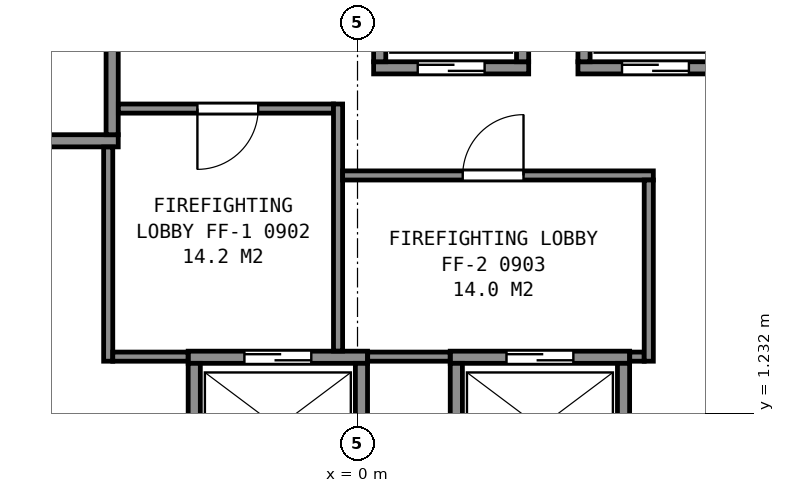
"""IFC4 building model, lengths in metres.
Left out: names, types, materials, properties, quantities, classifications, styles, units other than length and angle.
Written with IfcOpenShell. Run it as: python <this file> out.ifc"""

import sys

from ifc_helpers import new_model, si_unit, direction, frame, frame_2d, origin, place, context, subcontext, project, spatial, rectangle, extrude, element, fill, save


model = new_model("IFC4")
c1 = context("Model", 3, precision=1e-05, world=origin(), true_north=direction((0.0, 1.0)))
c2 = subcontext(c1, "Body", "Model", "MODEL_VIEW")
j1 = project(units=[si_unit("LENGTHUNIT", "METRE"), si_unit("PLANEANGLEUNIT", "RADIAN")], contexts=[c1])
p1 = place(None, origin())
s1 = spatial("IfcSite", under=j1, at=p1, CompositionType="ELEMENT")
p2 = place(p1, origin())
s2 = spatial("IfcBuilding", under=s1, at=p2, CompositionType="ELEMENT")
p3 = place(p2, frame((0.0, 0.0, 47.6)))
s3 = spatial("IfcBuildingStorey", under=s2, at=p3, CompositionType="ELEMENT", Elevation=47.6)
p4 = place(p3, frame((-2.785, 2.15, 0.0), z_axis=(0.0, 0.0, 1.0), x_axis=(1.0, 0.0, 0.0)))
e1 = element("IfcWall", 1, at=p4, inside=s3, PredefinedType="PARTITIONING", context=c2, shape_type="SweptSolid", body=[
    extrude(rectangle(XDim=2.95, YDim=0.2, at=frame_2d((1.475, 0.0))), origin(), (0.0, 0.0, 1.0), 3.6),
])
p5 = place(p4, frame((0.925, 0.0, 0.0)))
e2 = element("IfcOpeningElement", 2, at=p5, cuts=e1, PredefinedType="OPENING", context=c2, shape_type="SweptSolid", body=[
    extrude(rectangle(XDim=1.1, YDim=2.1, at=frame_2d((0.55, 1.05))), frame((0.0, 0.11, 0.0), z_axis=(0.0, -1.0, 0.0), x_axis=(1.0, 0.0, 0.0)), (0.0, 0.0, 1.0), 0.22),
])
p6 = place(p3, frame((1.525, 2.15, 0.0), z_axis=(0.0, 0.0, 1.0), x_axis=(1.0, 0.0, 0.0)))
e3 = element("IfcWall", 3, at=p6, inside=s3, PredefinedType="PARTITIONING", context=c2, shape_type="SweptSolid", body=[
    extrude(rectangle(XDim=2.95, YDim=0.2, at=frame_2d((1.475, 0.0))), origin(), (0.0, 0.0, 1.0), 3.6),
])
p7 = place(p6, frame((0.925, 0.0, 0.0)))
e4 = element("IfcOpeningElement", 4, at=p7, cuts=e3, PredefinedType="OPENING", context=c2, shape_type="SweptSolid", body=[
    extrude(rectangle(XDim=1.1, YDim=2.1, at=frame_2d((0.55, 1.05))), frame((0.0, 0.11, 0.0), z_axis=(0.0, -1.0, 0.0), x_axis=(1.0, 0.0, 0.0)), (0.0, 0.0, 1.0), 0.22),
])
p8 = place(p3, frame((-6.285, 5.71, 0.0), z_axis=(0.0, 0.0, 1.0), x_axis=(1.0, 0.0, 0.0)))
e5 = element("IfcWall", 5, at=p8, inside=s3, PredefinedType="PARTITIONING", context=c2, shape_type="SweptSolid", body=[
    extrude(rectangle(XDim=2.35, YDim=0.2, at=frame_2d((1.175, 0.0))), origin(), (0.0, 0.0, 1.0), 3.6),
])
p9 = place(p3, frame((0.265, 6.91, 0.0), z_axis=(0.0, 0.0, 1.0), x_axis=(1.0, 0.0, 0.0)))
e6 = element("IfcWall", 6, at=p9, inside=s3, PredefinedType="PARTITIONING", context=c2, shape_type="SweptSolid", body=[
    extrude(rectangle(XDim=2.55, YDim=0.2, at=frame_2d((1.275, 0.0))), origin(), (0.0, 0.0, 1.0), 3.6),
])
p10 = place(p9, frame((0.725, 0.0, 0.0)))
e7 = element("IfcOpeningElement", 7, at=p10, cuts=e6, PredefinedType="OPENING", context=c2, shape_type="SweptSolid", body=[
    extrude(rectangle(XDim=1.1, YDim=2.1, at=frame_2d((0.55, 1.05))), frame((0.0, 0.11, 0.0), z_axis=(0.0, -1.0, 0.0), x_axis=(1.0, 0.0, 0.0)), (0.0, 0.0, 1.0), 0.22),
])
p11 = place(p3, frame((3.625, 6.91, 0.0), z_axis=(0.0, 0.0, 1.0), x_axis=(1.0, 0.0, 0.0)))
e8 = element("IfcWall", 8, at=p11, inside=s3, PredefinedType="PARTITIONING", context=c2, shape_type="SweptSolid", body=[
    extrude(rectangle(XDim=2.55, YDim=0.2, at=frame_2d((1.275, 0.0))), origin(), (0.0, 0.0, 1.0), 3.6),
])
p12 = place(p11, frame((0.725, 0.0, 0.0)))
e9 = element("IfcOpeningElement", 9, at=p12, cuts=e8, PredefinedType="OPENING", context=c2, shape_type="SweptSolid", body=[
    extrude(rectangle(XDim=1.1, YDim=2.1, at=frame_2d((0.55, 1.05))), frame((0.0, 0.11, 0.0), z_axis=(0.0, -1.0, 0.0), x_axis=(1.0, 0.0, 0.0)), (0.0, 0.0, 1.0), 0.22),
])
p13 = place(p3, frame((5.663, -1.612, 0.0), z_axis=(0.0, 0.0, 1.0), x_axis=(0.49998122708, 0.866036242063, 0.0)))
e10 = element("IfcWall", 10, at=p13, inside=s3, PredefinedType="PARTITIONING", context=c2, shape_type="SweptSolid", body=[
    extrude(rectangle(XDim=4.9, YDim=0.2, at=frame_2d((2.45, 0.0))), origin(), (0.0, 0.0, 1.0), 3.6),
])
p14 = place(p3, frame((4.375, 0.1, 0.0), z_axis=(0.0, 0.0, 1.0), x_axis=(0.0, 1.0, 0.0)))
e11 = element("IfcWall", 11, at=p14, inside=s3, PredefinedType="PARTITIONING", context=c2, shape_type="SweptSolid", body=[
    extrude(rectangle(XDim=1.95, YDim=0.2, at=frame_2d((0.975, 0.0))), origin(), (0.0, 0.0, 1.0), 3.6),
])
for number, where, z_axis, x_axis in (
    (12, (3.725, 7.01, 0.0), (0.0, 0.0, 1.0), (0.0, 1.0, 0.0)),
    (13, (2.715, 7.01, 0.0), (0.0, 0.0, 1.0), (0.0, 1.0, 0.0)),
):
    element("IfcWall", number, at=place(p3, frame(where, z_axis=z_axis, x_axis=x_axis)), inside=s3, PredefinedType="PARTITIONING", context=c2, shape_type="SweptSolid", body=[
        extrude(rectangle(XDim=1.75, YDim=0.2, at=frame_2d((0.875, 0.0))), origin(), (0.0, 0.0, 1.0), 3.6),
    ])
p15 = place(p3, frame((1.625, 0.1, 0.0), z_axis=(0.0, 0.0, 1.0), x_axis=(0.0, 1.0, 0.0)))
e14 = element("IfcWall", 14, at=p15, inside=s3, PredefinedType="PARTITIONING", context=c2, shape_type="SweptSolid", body=[
    extrude(rectangle(XDim=1.95, YDim=0.2, at=frame_2d((0.975, 0.0))), origin(), (0.0, 0.0, 1.0), 3.6),
])
p16 = place(p3, frame((0.365, 7.01, 0.0), z_axis=(0.0, 0.0, 1.0), x_axis=(0.0, 1.0, 0.0)))
e15 = element("IfcWall", 15, at=p16, inside=s3, PredefinedType="PARTITIONING", context=c2, shape_type="SweptSolid", body=[
    extrude(rectangle(XDim=1.75, YDim=0.2, at=frame_2d((0.875, 0.0))), origin(), (0.0, 0.0, 1.0), 3.6),
])
for number, where, z_axis, x_axis in (
    (16, (0.065, 0.1, 0.0), (0.0, 0.0, 1.0), (0.0, 1.0, 0.0)),
    (17, (-2.685, 0.1, 0.0), (0.0, 0.0, 1.0), (0.0, 1.0, 0.0)),
):
    element("IfcWall", number, at=place(p3, frame(where, z_axis=z_axis, x_axis=x_axis)), inside=s3, PredefinedType="PARTITIONING", context=c2, shape_type="SweptSolid", body=[
        extrude(rectangle(XDim=1.95, YDim=0.2, at=frame_2d((0.975, 0.0))), origin(), (0.0, 0.0, 1.0), 3.6),
    ])
p17 = place(p3, frame((-4.035, 5.81, 0.0), z_axis=(0.0, 0.0, 1.0), x_axis=(0.0, 1.0, 0.0)))
e18 = element("IfcWall", 18, at=p17, inside=s3, PredefinedType="PARTITIONING", context=c2, shape_type="SweptSolid", body=[
    extrude(rectangle(XDim=1.75, YDim=0.2, at=frame_2d((0.875, 0.0))), origin(), (0.0, 0.0, 1.0), 3.6),
])
p18 = place(p3, frame((-13.664, 5.946, 0.0), z_axis=(0.0, 0.0, 1.0), x_axis=(0.499994327219, -0.866028678941, 0.0)))
e19 = element("IfcWall", 19, at=p18, inside=s3, PredefinedType="PARTITIONING", context=c2, shape_type="SweptSolid", body=[
    extrude(rectangle(XDim=23.968, YDim=0.2, at=frame_2d((11.984, 0.0))), origin(), (0.0, 0.0, 1.0), 3.35),
])
p19 = place(p3, frame((-4.1, 2.085, 0.0), z_axis=(0.0, 0.0, 1.0), x_axis=(0.0, 1.0, 0.0)))
e20 = element("IfcWall", 20, at=p19, inside=s3, PredefinedType="PARTITIONING", context=c2, shape_type="SweptSolid", body=[
    extrude(rectangle(XDim=3.523, YDim=0.15, at=frame_2d((1.761, 0.0))), origin(), (0.0, 0.0, 1.0), 3.35),
])
p20 = place(p3, frame((-4.025, 2.16, 0.0), z_axis=(0.0, 0.0, 1.0), x_axis=(1.0, 0.0, 0.0)))
e21 = element("IfcWall", 21, at=p20, inside=s3, PredefinedType="PARTITIONING", context=c2, shape_type="SweptSolid", body=[
    extrude(rectangle(XDim=1.238, YDim=0.15, at=frame_2d((0.619, 0.0))), origin(), (0.0, 0.0, 1.0), 3.35),
])
p21 = place(p3, frame((-3.933, 6.24, 0.0), z_axis=(0.0, 0.0, 1.0), x_axis=(1.0, 0.0, 0.0)))
e22 = element("IfcWall", 22, at=p21, inside=s3, PredefinedType="PARTITIONING", context=c2, shape_type="SweptSolid", body=[
    extrude(rectangle(XDim=3.538, YDim=0.15, at=frame_2d((1.769, 0.0))), origin(), (0.0, 0.0, 1.0), 3.35),
])
p22 = place(p21, frame((1.3, 0.0, 0.0)))
e23 = element("IfcOpeningElement", 23, at=p22, cuts=e22, PredefinedType="OPENING", context=c2, shape_type="SweptSolid", body=[
    extrude(rectangle(XDim=1.0, YDim=2.1, at=frame_2d((0.5, 1.05))), frame((0.0, 0.085, 0.0), z_axis=(0.0, -1.0, 0.0), x_axis=(1.0, 0.0, 0.0)), (0.0, 0.0, 1.0), 0.17),
])
p23 = place(p3, frame((-0.32, 2.252, 0.0), z_axis=(0.0, 0.0, 1.0), x_axis=(0.0, 1.0, 0.0)))
e24 = element("IfcWall", 24, at=p23, inside=s3, PredefinedType="PARTITIONING", context=c2, shape_type="SweptSolid", body=[
    extrude(rectangle(XDim=4.063, YDim=0.15, at=frame_2d((2.031, 0.0))), origin(), (0.0, 0.0, 1.0), 3.35),
])
p24 = place(p3, frame((-0.245, 5.14, 0.0), z_axis=(0.0, 0.0, 1.0), x_axis=(1.0, 0.0, 0.0)))
e25 = element("IfcWall", 25, at=p24, inside=s3, PredefinedType="PARTITIONING", context=c2, shape_type="SweptSolid", body=[
    extrude(rectangle(XDim=5.11, YDim=0.15, at=frame_2d((2.555, 0.0))), origin(), (0.0, 0.0, 1.0), 3.35),
])
p25 = place(p24, frame((1.975, 0.0, 0.0)))
e26 = element("IfcOpeningElement", 26, at=p25, cuts=e25, PredefinedType="OPENING", context=c2, shape_type="SweptSolid", body=[
    extrude(rectangle(XDim=1.0, YDim=2.1, at=frame_2d((0.5, 1.05))), frame((0.0, 0.085, 0.0), z_axis=(0.0, -1.0, 0.0), x_axis=(1.0, 0.0, 0.0)), (0.0, 0.0, 1.0), 0.17),
])
p26 = place(p3, frame((0.167, 2.16, 0.0), z_axis=(0.0, 0.0, 1.0), x_axis=(1.0, 0.0, 0.0)))
e27 = element("IfcWall", 27, at=p26, inside=s3, PredefinedType="PARTITIONING", context=c2, shape_type="SweptSolid", body=[
    extrude(rectangle(XDim=1.356, YDim=0.15, at=frame_2d((0.678, 0.0))), origin(), (0.0, 0.0, 1.0), 3.35),
])
p27 = place(p3, frame((4.477, 2.16, 0.0), z_axis=(0.0, 0.0, 1.0), x_axis=(1.0, 0.0, 0.0)))
e28 = element("IfcWall", 28, at=p27, inside=s3, PredefinedType="PARTITIONING", context=c2, shape_type="SweptSolid", body=[
    extrude(rectangle(XDim=0.238, YDim=0.15, at=frame_2d((0.119, 0.0))), origin(), (0.0, 0.0, 1.0), 3.35),
])
p28 = place(p3, frame((4.79, 2.085, 0.0), z_axis=(0.0, 0.0, 1.0), x_axis=(0.0, 1.0, 0.0)))
e29 = element("IfcWall", 29, at=p28, inside=s3, PredefinedType="PARTITIONING", context=c2, shape_type="SweptSolid", body=[
    extrude(rectangle(XDim=2.98, YDim=0.15, at=frame_2d((1.49, 0.0))), origin(), (0.0, 0.0, 1.0), 3.35),
])
p29 = place(p3, frame((-3.766, -17.959, 0.0), z_axis=(0.0, 0.0, 1.0), x_axis=(-0.500002884005, 0.866023738697, 0.0)))
e30 = element("IfcWall", 30, at=p29, inside=s3, PredefinedType="PARTITIONING", context=c2, shape_type="SweptSolid", body=[
    extrude(rectangle(XDim=28.135, YDim=0.125, at=frame_2d((14.067, 0.0))), origin(), (0.0, 0.0, 1.0), 2.613),
])
p30 = place(p29, frame((25.422, 0.0, 0.0)))
e31 = element("IfcOpeningElement", 31, at=p30, cuts=e30, PredefinedType="OPENING", context=c2, shape_type="SweptSolid", body=[
    extrude(rectangle(XDim=1.0, YDim=2.1, at=frame_2d((0.5, 1.05))), frame((0.0, 0.073, 0.0), z_axis=(0.0, -1.0, 0.0), x_axis=(1.0, 0.0, 0.0)), (0.0, 0.0, 1.0), 0.145),
])
p31 = place(p29, frame((21.693, 0.0, 0.0)))
e32 = element("IfcOpeningElement", 32, at=p31, cuts=e30, PredefinedType="OPENING", context=c2, shape_type="SweptSolid", body=[
    extrude(rectangle(XDim=0.9, YDim=2.1, at=frame_2d((0.45, 1.05))), frame((0.0, 0.073, 0.0), z_axis=(0.0, -1.0, 0.0), x_axis=(1.0, 0.0, 0.0)), (0.0, 0.0, 1.0), 0.145),
])
p32 = place(p29, frame((14.438, 0.0, 0.0)))
e33 = element("IfcOpeningElement", 33, at=p32, cuts=e30, PredefinedType="OPENING", context=c2, shape_type="SweptSolid", body=[
    extrude(rectangle(XDim=0.9, YDim=2.1, at=frame_2d((0.45, 1.05))), frame((0.0, 0.073, 0.0), z_axis=(0.0, -1.0, 0.0), x_axis=(1.0, 0.0, 0.0)), (0.0, 0.0, 1.0), 0.145),
])
p33 = place(p29, frame((11.712, 0.0, 0.0)))
e34 = element("IfcOpeningElement", 34, at=p33, cuts=e30, PredefinedType="OPENING", context=c2, shape_type="SweptSolid", body=[
    extrude(rectangle(XDim=0.9, YDim=2.1, at=frame_2d((0.45, 1.05))), frame((0.0, 0.073, 0.0), z_axis=(0.0, -1.0, 0.0), x_axis=(1.0, 0.0, 0.0)), (0.0, 0.0, 1.0), 0.145),
])
p34 = place(p29, frame((4.787, 0.0, 0.0)))
e35 = element("IfcOpeningElement", 35, at=p34, cuts=e30, PredefinedType="OPENING", context=c2, shape_type="SweptSolid", body=[
    extrude(rectangle(XDim=0.9, YDim=2.1, at=frame_2d((0.45, 1.05))), frame((0.0, 0.073, 0.0), z_axis=(0.0, -1.0, 0.0), x_axis=(1.0, 0.0, 0.0)), (0.0, 0.0, 1.0), 0.145),
])
p35 = place(p29, frame((1.762, 0.0, 0.0)))
e36 = element("IfcOpeningElement", 36, at=p35, cuts=e30, PredefinedType="OPENING", context=c2, shape_type="SweptSolid", body=[
    extrude(rectangle(XDim=0.9, YDim=2.1, at=frame_2d((0.45, 1.05))), frame((0.0, 0.073, 0.0), z_axis=(0.0, -1.0, 0.0), x_axis=(1.0, 0.0, 0.0)), (0.0, 0.0, 1.0), 0.145),
])
p36 = place(p3, frame((17.833, 6.406, 0.0), z_axis=(0.0, 0.0, 1.0), x_axis=(-0.500002884005, -0.866023738697, 0.0)))
e37 = element("IfcWall", 37, at=p36, inside=s3, PredefinedType="PARTITIONING", context=c2, shape_type="SweptSolid", body=[
    extrude(rectangle(XDim=28.135, YDim=0.125, at=frame_2d((14.067, 0.0))), origin(), (0.0, 0.0, 1.0), 2.613),
])
p37 = place(p36, frame((26.522, 0.0, 0.0)))
e38 = element("IfcOpeningElement", 38, at=p37, cuts=e37, PredefinedType="OPENING", context=c2, shape_type="SweptSolid", body=[
    extrude(rectangle(XDim=0.9, YDim=2.1, at=frame_2d((0.45, 1.05))), frame((0.0, 0.073, 0.0), z_axis=(0.0, -1.0, 0.0), x_axis=(1.0, 0.0, 0.0)), (0.0, 0.0, 1.0), 0.145),
])
p38 = place(p36, frame((23.184, 0.0, 0.0)))
e39 = element("IfcOpeningElement", 39, at=p38, cuts=e37, PredefinedType="OPENING", context=c2, shape_type="SweptSolid", body=[
    extrude(rectangle(XDim=0.9, YDim=2.1, at=frame_2d((0.45, 1.05))), frame((0.0, 0.073, 0.0), z_axis=(0.0, -1.0, 0.0), x_axis=(1.0, 0.0, 0.0)), (0.0, 0.0, 1.0), 0.145),
])
p39 = place(p36, frame((18.683, 0.0, 0.0)))
e40 = element("IfcOpeningElement", 40, at=p39, cuts=e37, PredefinedType="OPENING", context=c2, shape_type="SweptSolid", body=[
    extrude(rectangle(XDim=0.9, YDim=2.1, at=frame_2d((0.45, 1.05))), frame((0.0, 0.073, 0.0), z_axis=(0.0, -1.0, 0.0), x_axis=(1.0, 0.0, 0.0)), (0.0, 0.0, 1.0), 0.145),
])
p40 = place(p36, frame((14.182, 0.0, 0.0)))
e41 = element("IfcOpeningElement", 41, at=p40, cuts=e37, PredefinedType="OPENING", context=c2, shape_type="SweptSolid", body=[
    extrude(rectangle(XDim=0.9, YDim=2.1, at=frame_2d((0.45, 1.05))), frame((0.0, 0.073, 0.0), z_axis=(0.0, -1.0, 0.0), x_axis=(1.0, 0.0, 0.0)), (0.0, 0.0, 1.0), 0.145),
])
p41 = place(p36, frame((9.681, 0.0, 0.0)))
e42 = element("IfcOpeningElement", 42, at=p41, cuts=e37, PredefinedType="OPENING", context=c2, shape_type="SweptSolid", body=[
    extrude(rectangle(XDim=0.9, YDim=2.1, at=frame_2d((0.45, 1.05))), frame((0.0, 0.073, 0.0), z_axis=(0.0, -1.0, 0.0), x_axis=(1.0, 0.0, 0.0)), (0.0, 0.0, 1.0), 0.145),
])
p42 = place(p36, frame((5.18, 0.0, 0.0)))
e43 = element("IfcOpeningElement", 43, at=p42, cuts=e37, PredefinedType="OPENING", context=c2, shape_type="SweptSolid", body=[
    extrude(rectangle(XDim=0.9, YDim=2.1, at=frame_2d((0.45, 1.05))), frame((0.0, 0.073, 0.0), z_axis=(0.0, -1.0, 0.0), x_axis=(1.0, 0.0, 0.0)), (0.0, 0.0, 1.0), 0.145),
])
p43 = place(p36, frame((1.278, 0.0, 0.0)))
e44 = element("IfcOpeningElement", 44, at=p43, cuts=e37, PredefinedType="OPENING", context=c2, shape_type="SweptSolid", body=[
    extrude(rectangle(XDim=0.9, YDim=2.1, at=frame_2d((0.45, 1.05))), frame((0.0, 0.073, 0.0), z_axis=(0.0, -1.0, 0.0), x_axis=(1.0, 0.0, 0.0)), (0.0, 0.0, 1.0), 0.145),
])
p44 = place(p10, origin())
e45 = element("IfcDoor", 45, at=p44, inside=s3, OperationType="SLIDING_TO_LEFT", PredefinedType="DOOR", context=c2, shape_type="SweptSolid", body=[
    extrude(rectangle(XDim=1.1, YDim=2.1, at=frame_2d((0.55, 1.05))), frame((0.0, 0.025, 0.0), z_axis=(0.0, -1.0, 0.0), x_axis=(1.0, 0.0, 0.0)), (0.0, 0.0, 1.0), 0.05),
])
fill(e7, e45)
p45 = place(p12, origin())
e46 = element("IfcDoor", 46, at=p45, inside=s3, OperationType="SLIDING_TO_LEFT", PredefinedType="DOOR", context=c2, shape_type="SweptSolid", body=[
    extrude(rectangle(XDim=1.1, YDim=2.1, at=frame_2d((0.55, 1.05))), frame((0.0, 0.025, 0.0), z_axis=(0.0, -1.0, 0.0), x_axis=(1.0, 0.0, 0.0)), (0.0, 0.0, 1.0), 0.05),
])
fill(e9, e46)
p46 = place(p5, origin())
e47 = element("IfcDoor", 47, at=p46, inside=s3, OperationType="SLIDING_TO_LEFT", PredefinedType="DOOR", context=c2, shape_type="SweptSolid", body=[
    extrude(rectangle(XDim=1.1, YDim=2.1, at=frame_2d((0.55, 1.05))), frame((0.0, 0.025, 0.0), z_axis=(0.0, -1.0, 0.0), x_axis=(1.0, 0.0, 0.0)), (0.0, 0.0, 1.0), 0.05),
])
fill(e2, e47)
p47 = place(p7, origin())
e48 = element("IfcDoor", 48, at=p47, inside=s3, OperationType="SLIDING_TO_RIGHT", PredefinedType="DOOR", context=c2, shape_type="SweptSolid", body=[
    extrude(rectangle(XDim=1.1, YDim=2.1, at=frame_2d((0.55, 1.05))), frame((0.0, 0.025, 0.0), z_axis=(0.0, -1.0, 0.0), x_axis=(1.0, 0.0, 0.0)), (0.0, 0.0, 1.0), 0.05),
])
fill(e4, e48)
p48 = place(p22, origin())
e49 = element("IfcDoor", 49, at=p48, inside=s3, OperationType="SINGLE_SWING_LEFT", PredefinedType="DOOR", context=c2, shape_type="SweptSolid", body=[
    extrude(rectangle(XDim=1.0, YDim=2.1, at=frame_2d((0.5, 1.05))), frame((0.0, 0.025, 0.0), z_axis=(0.0, -1.0, 0.0), x_axis=(1.0, 0.0, 0.0)), (0.0, 0.0, 1.0), 0.05),
])
fill(e23, e49)
p49 = place(p25, origin())
e50 = element("IfcDoor", 50, at=p49, inside=s3, OperationType="SINGLE_SWING_RIGHT", PredefinedType="DOOR", context=c2, shape_type="SweptSolid", body=[
    extrude(rectangle(XDim=1.0, YDim=2.1, at=frame_2d((0.5, 1.05))), frame((0.0, 0.025, 0.0), z_axis=(0.0, -1.0, 0.0), x_axis=(1.0, 0.0, 0.0)), (0.0, 0.0, 1.0), 0.05),
])
fill(e26, e50)
save(model, sys.argv[1])
